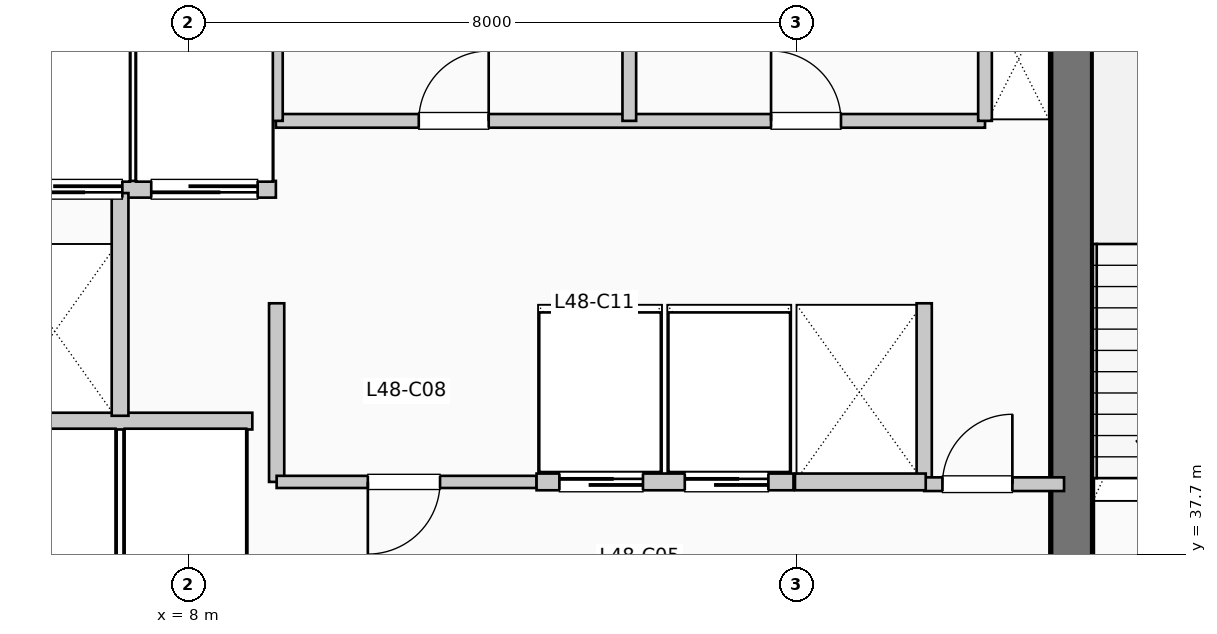
"""IFC4 building model, lengths in metres.
Left out: names, types, materials, properties, quantities, classifications, styles, units other than length and angle.
Written with IfcOpenShell. Run it as: python <this file> out.ifc"""

import sys

from ifc_helpers import new_model, si_unit, direction, frame, frame_2d, origin, place, context, subcontext, project, spatial, rectangle, extrude, element, fill, save


model = new_model("IFC4")
c1 = context("Model", 3, precision=1e-05, world=origin(), true_north=direction((0.0, 1.0)))
c2 = subcontext(c1, "Body", "Model", "MODEL_VIEW")
j1 = project(units=[si_unit("LENGTHUNIT", "METRE"), si_unit("PLANEANGLEUNIT", "RADIAN")], contexts=[c1])
p1 = place(None, origin())
s1 = spatial("IfcSite", under=j1, at=p1, CompositionType="ELEMENT")
p2 = place(p1, origin())
s2 = spatial("IfcBuilding", under=s1, at=p2, CompositionType="ELEMENT")
p3 = place(p2, frame((0.0, 0.0, 199.32)))
s3 = spatial("IfcBuildingStorey", under=s2, at=p3, CompositionType="ELEMENT", Elevation=199.32)
p4 = place(p3, frame((19.62, 37.15, 0.0), z_axis=(0.0, 0.0, 1.0), x_axis=(0.0, 1.0, 0.0)))
e1 = element("IfcWall", 1, at=p4, inside=s3, PredefinedType="SHEAR", context=c2, shape_type="SweptSolid", body=[
    extrude(rectangle(XDim=7.89, YDim=0.55, at=frame_2d((3.945, 0.0))), origin(), (0.0, 0.0, 1.0), 3.96),
])
p5 = place(p3, frame((5.38, 39.45, 0.0), z_axis=(0.0, 0.0, 1.0), x_axis=(1.0, 0.0, 0.0)))
e2 = element("IfcWall", 2, at=p5, inside=s3, PredefinedType="PARTITIONING", context=c2, shape_type="SweptSolid", body=[
    extrude(rectangle(XDim=3.46, YDim=0.22, at=frame_2d((1.73, 0.0))), origin(), (0.0, 0.0, 1.0), 3.71),
])
p6 = place(p3, frame((5.38, 42.5, 0.0), z_axis=(0.0, 0.0, 1.0), x_axis=(1.0, 0.0, 0.0)))
e3 = element("IfcWall", 3, at=p6, inside=s3, PredefinedType="PARTITIONING", context=c2, shape_type="SweptSolid", body=[
    extrude(rectangle(XDim=3.77, YDim=0.22, at=frame_2d((1.885, 0.0))), origin(), (0.0, 0.0, 1.0), 3.71),
])
p7 = place(p6, frame((1.75, 0.0, 0.0), z_axis=(0.0, 0.0, 1.0), x_axis=(-1.0, 0.0, 0.0)))
e4 = element("IfcOpeningElement", 4, at=p7, cuts=e3, PredefinedType="OPENING", context=c2, shape_type="SweptSolid", body=[
    extrude(rectangle(XDim=1.4, YDim=2.2, at=frame_2d((0.7, 1.1))), frame((0.0, 0.12, 0.0), z_axis=(0.0, -1.0, 0.0), x_axis=(1.0, 0.0, 0.0)), (0.0, 0.0, 1.0), 0.24),
])
p8 = place(p6, frame((3.53, 0.0, 0.0), z_axis=(0.0, 0.0, 1.0), x_axis=(-1.0, 0.0, 0.0)))
e5 = element("IfcOpeningElement", 5, at=p8, cuts=e3, PredefinedType="OPENING", context=c2, shape_type="SweptSolid", body=[
    extrude(rectangle(XDim=1.4, YDim=2.2, at=frame_2d((0.7, 1.1))), frame((0.0, 0.12, 0.0), z_axis=(0.0, -1.0, 0.0), x_axis=(1.0, 0.0, 0.0)), (0.0, 0.0, 1.0), 0.24),
])
p9 = place(p3, frame((7.1, 39.52, 0.0), z_axis=(0.0, 0.0, 1.0), x_axis=(0.0, 1.0, 0.0)))
e6 = element("IfcWall", 6, at=p9, inside=s3, PredefinedType="PARTITIONING", context=c2, shape_type="SweptSolid", body=[
    extrude(rectangle(XDim=2.93, YDim=0.22, at=frame_2d((1.465, 0.0))), origin(), (0.0, 0.0, 1.0), 3.71),
])
for number, where, z_axis, x_axis in (
    (7, (9.16, 38.65, 0.0), (0.0, 0.0, 1.0), (0.0, 1.0, 0.0)),
    (8, (17.68, 38.65, 0.0), (0.0, 0.0, 1.0), (0.0, 1.0, 0.0)),
):
    element("IfcWall", number, at=place(p3, frame(where, z_axis=z_axis, x_axis=x_axis)), inside=s3, PredefinedType="PARTITIONING", context=c2, shape_type="SweptSolid", body=[
        extrude(rectangle(XDim=2.35, YDim=0.2, at=frame_2d((1.175, 0.0))), origin(), (0.0, 0.0, 1.0), 3.71),
    ])
p10 = place(p3, frame((17.68, 38.62, 0.0), z_axis=(0.0, 0.0, 1.0), x_axis=(1.0, 0.0, 0.0)))
e9 = element("IfcWall", 9, at=p10, inside=s3, PredefinedType="PARTITIONING", context=c2, shape_type="SweptSolid", body=[
    extrude(rectangle(XDim=1.84, YDim=0.18, at=frame_2d((0.92, 0.0))), origin(), (0.0, 0.0, 1.0), 3.71),
])
p11 = place(p10, frame((0.24, 0.0, 0.0)))
e10 = element("IfcOpeningElement", 10, at=p11, cuts=e9, PredefinedType="OPENING", context=c2, shape_type="SweptSolid", body=[
    extrude(rectangle(XDim=0.92, YDim=2.1, at=frame_2d((0.46, 1.05))), frame((0.0, 0.1, 0.0), z_axis=(0.0, -1.0, 0.0), x_axis=(1.0, 0.0, 0.0)), (0.0, 0.0, 1.0), 0.2),
])
p12 = place(p3, frame((9.16, 38.65, 0.0), z_axis=(0.0, 0.0, 1.0), x_axis=(1.0, 0.0, 0.0)))
e11 = element("IfcWall", 11, at=p12, inside=s3, PredefinedType="PARTITIONING", context=c2, shape_type="SweptSolid", body=[
    extrude(rectangle(XDim=3.42, YDim=0.16, at=frame_2d((1.71, 0.0))), origin(), (0.0, 0.0, 1.0), 3.71),
])
p13 = place(p12, frame((2.15, 0.0, 0.0), z_axis=(0.0, 0.0, 1.0), x_axis=(-1.0, 0.0, 0.0)))
e12 = element("IfcOpeningElement", 12, at=p13, cuts=e11, PredefinedType="OPENING", context=c2, shape_type="SweptSolid", body=[
    extrude(rectangle(XDim=0.95, YDim=2.15, at=frame_2d((0.475, 1.075))), frame((0.0, 0.09, 0.0), z_axis=(0.0, -1.0, 0.0), x_axis=(1.0, 0.0, 0.0)), (0.0, 0.0, 1.0), 0.18),
])
p14 = place(p3, frame((12.58, 38.65, 0.0), z_axis=(0.0, 0.0, 1.0), x_axis=(1.0, 0.0, 0.0)))
e13 = element("IfcWall", 13, at=p14, inside=s3, PredefinedType="PARTITIONING", context=c2, shape_type="SweptSolid", body=[
    extrude(rectangle(XDim=3.38, YDim=0.22, at=frame_2d((1.69, 0.0))), origin(), (0.0, 0.0, 1.0), 3.71),
])
p15 = place(p14, frame((0.3, 0.0, 0.0)))
e14 = element("IfcOpeningElement", 14, at=p15, cuts=e13, PredefinedType="OPENING", context=c2, shape_type="SweptSolid", body=[
    extrude(rectangle(XDim=1.1, YDim=2.2, at=frame_2d((0.55, 1.1))), frame((0.0, 0.12, 0.0), z_axis=(0.0, -1.0, 0.0), x_axis=(1.0, 0.0, 0.0)), (0.0, 0.0, 1.0), 0.24),
])
p16 = place(p14, frame((1.95, 0.0, 0.0)))
e15 = element("IfcOpeningElement", 15, at=p16, cuts=e13, PredefinedType="OPENING", context=c2, shape_type="SweptSolid", body=[
    extrude(rectangle(XDim=1.1, YDim=2.2, at=frame_2d((0.55, 1.1))), frame((0.0, 0.12, 0.0), z_axis=(0.0, -1.0, 0.0), x_axis=(1.0, 0.0, 0.0)), (0.0, 0.0, 1.0), 0.24),
])
p17 = place(p3, frame((15.98, 38.65, 0.0), z_axis=(0.0, 0.0, 1.0), x_axis=(1.0, 0.0, 0.0)))
e16 = element("IfcWall", 16, at=p17, inside=s3, PredefinedType="PARTITIONING", context=c2, shape_type="SweptSolid", body=[
    extrude(rectangle(XDim=1.72, YDim=0.22, at=frame_2d((0.86, 0.0))), origin(), (0.0, 0.0, 1.0), 3.71),
])
p18 = place(p3, frame((9.15, 43.4, 0.0), z_axis=(0.0, 0.0, 1.0), x_axis=(1.0, 0.0, 0.0)))
e17 = element("IfcWall", 17, at=p18, inside=s3, PredefinedType="PLUMBINGWALL", context=c2, shape_type="SweptSolid", body=[
    extrude(rectangle(XDim=9.33, YDim=0.18, at=frame_2d((4.665, 0.0))), origin(), (0.0, 0.0, 1.0), 3.71),
])
p19 = place(p18, frame((1.88, 0.0, 0.0)))
e18 = element("IfcOpeningElement", 18, at=p19, cuts=e17, PredefinedType="OPENING", context=c2, shape_type="SweptSolid", body=[
    extrude(rectangle(XDim=0.92, YDim=2.1, at=frame_2d((0.46, 1.05))), frame((0.0, 0.1, 0.0), z_axis=(0.0, -1.0, 0.0), x_axis=(1.0, 0.0, 0.0)), (0.0, 0.0, 1.0), 0.2),
])
p20 = place(p18, frame((6.515, 0.0, 0.0)))
e19 = element("IfcOpeningElement", 19, at=p20, cuts=e17, PredefinedType="OPENING", context=c2, shape_type="SweptSolid", body=[
    extrude(rectangle(XDim=0.92, YDim=2.1, at=frame_2d((0.46, 1.05))), frame((0.0, 0.1, 0.0), z_axis=(0.0, -1.0, 0.0), x_axis=(1.0, 0.0, 0.0)), (0.0, 0.0, 1.0), 0.2),
])
for number, where, z_axis, x_axis in (
    (20, (9.15, 43.4, 0.0), (0.0, 0.0, 1.0), (0.0, 1.0, 0.0)),
    (21, (18.48, 43.4, 0.0), (0.0, 0.0, 1.0), (0.0, 1.0, 0.0)),
    (22, (13.8, 43.4, 0.0), (0.0, 0.0, 1.0), (0.0, 1.0, 0.0)),
):
    element("IfcWall", number, at=place(p3, frame(where, z_axis=z_axis, x_axis=x_axis)), inside=s3, PredefinedType="PLUMBINGWALL", context=c2, shape_type="SweptSolid", body=[
        extrude(rectangle(XDim=1.88, YDim=0.18, at=frame_2d((0.94, 0.0))), origin(), (0.0, 0.0, 1.0), 3.71),
    ])
p21 = place(p7, origin())
e23 = element("IfcDoor", 23, at=p21, inside=s3, OperationType="SLIDING_TO_LEFT", PredefinedType="DOOR", context=c2, shape_type="SweptSolid", body=[
    extrude(rectangle(XDim=1.4, YDim=2.2, at=frame_2d((0.7, 1.1))), frame((0.0, 0.025, 0.0), z_axis=(0.0, -1.0, 0.0), x_axis=(1.0, 0.0, 0.0)), (0.0, 0.0, 1.0), 0.05),
])
fill(e4, e23)
p22 = place(p8, origin())
e24 = element("IfcDoor", 24, at=p22, inside=s3, OperationType="SLIDING_TO_LEFT", PredefinedType="DOOR", context=c2, shape_type="SweptSolid", body=[
    extrude(rectangle(XDim=1.4, YDim=2.2, at=frame_2d((0.7, 1.1))), frame((0.0, 0.025, 0.0), z_axis=(0.0, -1.0, 0.0), x_axis=(1.0, 0.0, 0.0)), (0.0, 0.0, 1.0), 0.05),
])
fill(e5, e24)
p23 = place(p11, origin())
e25 = element("IfcDoor", 25, at=p23, inside=s3, OperationType="SINGLE_SWING_RIGHT", PredefinedType="DOOR", context=c2, shape_type="SweptSolid", body=[
    extrude(rectangle(XDim=0.92, YDim=2.1, at=frame_2d((0.46, 1.05))), frame((0.0, 0.025, 0.0), z_axis=(0.0, -1.0, 0.0), x_axis=(1.0, 0.0, 0.0)), (0.0, 0.0, 1.0), 0.05),
])
fill(e10, e25)
p24 = place(p13, origin())
e26 = element("IfcDoor", 26, at=p24, inside=s3, OperationType="SINGLE_SWING_LEFT", PredefinedType="DOOR", context=c2, shape_type="SweptSolid", body=[
    extrude(rectangle(XDim=0.95, YDim=2.15, at=frame_2d((0.475, 1.075))), frame((0.0, 0.025, 0.0), z_axis=(0.0, -1.0, 0.0), x_axis=(1.0, 0.0, 0.0)), (0.0, 0.0, 1.0), 0.05),
])
fill(e12, e26)
p25 = place(p15, origin())
e27 = element("IfcDoor", 27, at=p25, inside=s3, OperationType="SLIDING_TO_RIGHT", PredefinedType="DOOR", context=c2, shape_type="SweptSolid", body=[
    extrude(rectangle(XDim=1.1, YDim=2.2, at=frame_2d((0.55, 1.1))), frame((0.0, 0.025, 0.0), z_axis=(0.0, -1.0, 0.0), x_axis=(1.0, 0.0, 0.0)), (0.0, 0.0, 1.0), 0.05),
])
fill(e14, e27)
p26 = place(p16, origin())
e28 = element("IfcDoor", 28, at=p26, inside=s3, OperationType="SLIDING_TO_RIGHT", PredefinedType="DOOR", context=c2, shape_type="SweptSolid", body=[
    extrude(rectangle(XDim=1.1, YDim=2.2, at=frame_2d((0.55, 1.1))), frame((0.0, 0.025, 0.0), z_axis=(0.0, -1.0, 0.0), x_axis=(1.0, 0.0, 0.0)), (0.0, 0.0, 1.0), 0.05),
])
fill(e15, e28)
p27 = place(p19, origin())
e29 = element("IfcDoor", 29, at=p27, inside=s3, OperationType="SINGLE_SWING_RIGHT", PredefinedType="DOOR", context=c2, shape_type="SweptSolid", body=[
    extrude(rectangle(XDim=0.92, YDim=2.1, at=frame_2d((0.46, 1.05))), frame((0.0, 0.025, 0.0), z_axis=(0.0, -1.0, 0.0), x_axis=(1.0, 0.0, 0.0)), (0.0, 0.0, 1.0), 0.05),
])
fill(e18, e29)
p28 = place(p20, origin())
e30 = element("IfcDoor", 30, at=p28, inside=s3, OperationType="SINGLE_SWING_LEFT", PredefinedType="DOOR", context=c2, shape_type="SweptSolid", body=[
    extrude(rectangle(XDim=0.92, YDim=2.1, at=frame_2d((0.46, 1.05))), frame((0.0, 0.025, 0.0), z_axis=(0.0, -1.0, 0.0), x_axis=(1.0, 0.0, 0.0)), (0.0, 0.0, 1.0), 0.05),
])
fill(e19, e30)
save(model, sys.argv[1])
